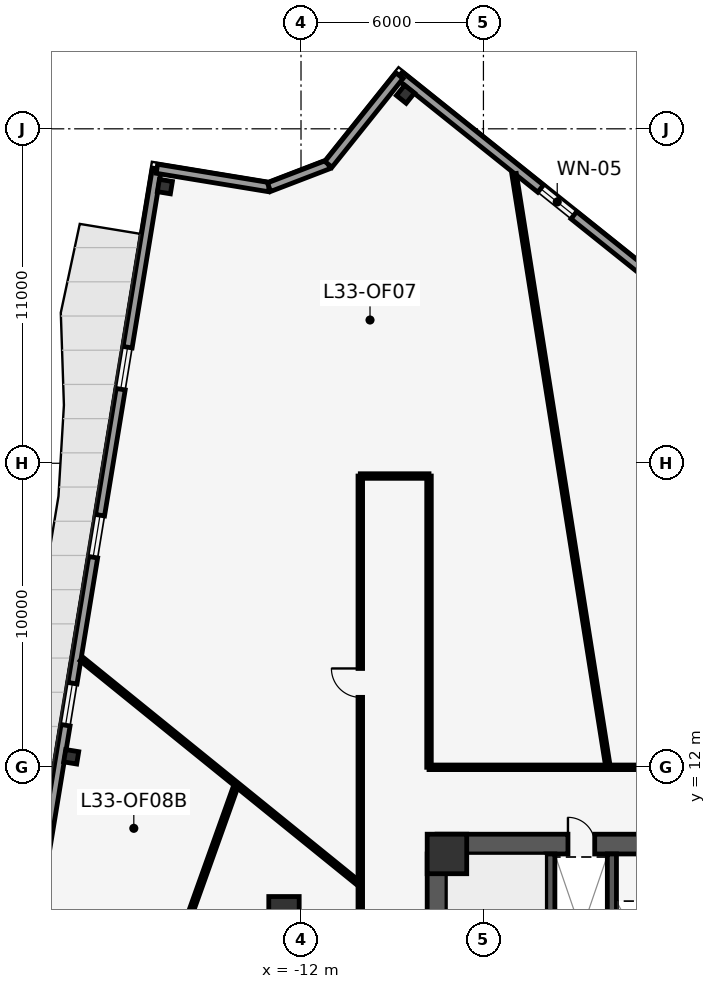
"""IFC4 building model, lengths in metres.
Left out: names, types, materials, properties, quantities, classifications, styles, units other than length and angle.
Written with IfcOpenShell. Run it as: python <this file> out.ifc"""

import sys

from ifc_helpers import new_model, si_unit, direction, frame, frame_2d, origin, origin_2d, place, context, subcontext, project, spatial, rectangle, i_section, extrude, element, fill, save


model = new_model("IFC4")
c1 = context("Model", 3, precision=1e-05, world=origin(), true_north=direction((0.0, 1.0)))
c2 = subcontext(c1, "Body", "Model", "MODEL_VIEW")
j1 = project(units=[si_unit("LENGTHUNIT", "METRE"), si_unit("PLANEANGLEUNIT", "RADIAN")], contexts=[c1])
p1 = place(None, origin())
s1 = spatial("IfcSite", under=j1, at=p1, CompositionType="ELEMENT")
p2 = place(p1, origin())
s2 = spatial("IfcBuilding", under=s1, at=p2, CompositionType="ELEMENT")
p3 = place(p2, frame((0.0, 0.0, 144.5)))
s3 = spatial("IfcBuildingStorey", under=s2, at=p3, CompositionType="ELEMENT", Elevation=144.5)
p4 = place(p3, frame((-7.525, 9.475, 0.0), z_axis=(0.0, 0.0, 1.0), x_axis=(1.0, 0.0, 0.0)))
e1 = element("IfcWall", 1, at=p4, inside=s3, PredefinedType="SHEAR", context=c2, shape_type="SweptSolid", body=[
    extrude(rectangle(XDim=15.05, YDim=0.65, at=frame_2d((7.525, 0.0))), origin(), (0.0, 0.0, 1.0), 3.85),
])
p5 = place(p4, frame((6.975, 0.0, 0.0)))
e2 = element("IfcOpeningElement", 2, at=p5, cuts=e1, PredefinedType="OPENING", context=c2, shape_type="SweptSolid", body=[
    extrude(rectangle(XDim=1.1, YDim=2.15, at=frame_2d((0.55, 1.075))), frame((0.0, 0.335, 0.0), z_axis=(0.0, -1.0, 0.0), x_axis=(1.0, 0.0, 0.0)), (0.0, 0.0, 1.0), 0.67),
])
p6 = place(p4, frame((4.305, 0.0, 0.0)))
e3 = element("IfcOpeningElement", 3, at=p6, cuts=e1, PredefinedType="OPENING", context=c2, shape_type="SweptSolid", body=[
    extrude(rectangle(XDim=0.88, YDim=2.15, at=frame_2d((0.44, 1.075))), frame((0.0, 0.335, 0.0), z_axis=(0.0, -1.0, 0.0), x_axis=(1.0, 0.0, 0.0)), (0.0, 0.0, 1.0), 0.67),
])
p7 = place(p4, frame((9.865, 0.0, 0.0)))
e4 = element("IfcOpeningElement", 4, at=p7, cuts=e1, PredefinedType="OPENING", context=c2, shape_type="SweptSolid", body=[
    extrude(rectangle(XDim=0.88, YDim=2.15, at=frame_2d((0.44, 1.075))), frame((0.0, 0.335, 0.0), z_axis=(0.0, -1.0, 0.0), x_axis=(1.0, 0.0, 0.0)), (0.0, 0.0, 1.0), 0.67),
])
for number, where, z_axis, x_axis in (
    (5, (-3.8, 1.45, 0.0), (0.0, 0.0, 1.0), (0.0, 1.0, 0.0)),
    (6, (-1.775, 1.45, 0.0), (0.0, 0.0, 1.0), (0.0, 1.0, 0.0)),
):
    element("IfcWall", number, at=place(p3, frame(where, z_axis=z_axis, x_axis=x_axis)), inside=s3, PredefinedType="SHEAR", context=c2, shape_type="SweptSolid", body=[
        extrude(rectangle(XDim=7.7, YDim=0.3, at=frame_2d((3.85, 0.0))), origin(), (0.0, 0.0, 1.0), 3.85),
    ])
p8 = place(p3, frame((-7.525, 0.1, 0.0), z_axis=(0.0, 0.0, 1.0), x_axis=(0.0, 1.0, 0.0)))
e7 = element("IfcWall", 7, at=p8, inside=s3, PredefinedType="SHEAR", context=c2, shape_type="SweptSolid", body=[
    extrude(rectangle(XDim=9.05, YDim=0.65, at=frame_2d((4.525, 0.0))), origin(), (0.0, 0.0, 1.0), 3.85),
])
p9 = place(p3, frame((-7.2, 9.15, 0.0), z_axis=(0.0, 0.0, 1.0), x_axis=(1.0, 0.0, 0.0)))
e8 = element("IfcColumn", 8, at=p9, inside=s3, PredefinedType="COLUMN", context=c2, shape_type="SweptSolid", body=[
    extrude(rectangle(XDim=1.3, YDim=1.3, at=origin_2d()), origin(), (0.0, 0.0, 1.0), 4.1),
])
p10 = place(p3, frame((-12.56, 7.25, 0.0), z_axis=(0.0, 0.0, 1.0), x_axis=(1.0, 0.0, 0.0)))
e9 = element("IfcColumn", 9, at=p10, inside=s3, PredefinedType="COLUMN", context=c2, shape_type="SweptSolid", body=[
    extrude(rectangle(XDim=1.0, YDim=1.0, at=origin_2d()), origin(), (0.0, 0.0, 1.0), 4.1),
])
for number, where, z_axis, x_axis in (
    (10, (-16.477, 31.1, 0.0), (0.0, 0.0, 1.0), (0.162, 0.987, 0.0)),
    (11, (-19.559, 12.346, 0.0), (0.0, 0.0, 1.0), (0.162, 0.987, 0.0)),
    (12, (-8.565, 34.138, 0.0), (0.0, 0.0, 1.0), (-0.781, 0.625, 0.0)),
):
    element("IfcColumn", number, at=place(p3, frame(where, z_axis=z_axis, x_axis=x_axis)), inside=s3, PredefinedType="COLUMN", context=c2, shape_type="SweptSolid", body=[
        extrude(i_section(OverallWidth=0.411, OverallDepth=0.434, WebThickness=0.036, FlangeThickness=0.057, at=origin_2d()), origin(), (0.0, 0.0, 1.0), 4.1),
    ])
p11 = place(p3, frame((-8.762, 34.748, 0.0), z_axis=(0.0, 0.0, 1.0), x_axis=(0.780669916438, -0.624943582708, 0.0)))
e13 = element("IfcWall", 13, at=p11, inside=s3, PredefinedType="STANDARD", context=c2, shape_type="SweptSolid", body=[
    extrude(rectangle(XDim=58.093, YDim=0.3, at=frame_2d((29.046, 0.0))), origin(), (0.0, 0.0, 1.0), 3.85),
])
p12 = place(p11, frame((5.947, 0.0, 0.85)))
e14 = element("IfcOpeningElement", 14, at=p12, cuts=e13, PredefinedType="OPENING", context=c2, shape_type="SweptSolid", body=[
    extrude(rectangle(XDim=1.4, YDim=2.2, at=frame_2d((0.7, 1.1))), frame((0.0, 0.16, 0.0), z_axis=(0.0, -1.0, 0.0), x_axis=(1.0, 0.0, 0.0)), (0.0, 0.0, 1.0), 0.32),
])
p13 = place(p11, frame((11.547, 0.0, 0.85)))
e15 = element("IfcOpeningElement", 15, at=p13, cuts=e13, PredefinedType="OPENING", context=c2, shape_type="SweptSolid", body=[
    extrude(rectangle(XDim=1.4, YDim=2.2, at=frame_2d((0.7, 1.1))), frame((0.0, 0.16, 0.0), z_axis=(0.0, -1.0, 0.0), x_axis=(1.0, 0.0, 0.0)), (0.0, 0.0, 1.0), 0.32),
])
p14 = place(p11, frame((17.146, 0.0, 0.85)))
e16 = element("IfcOpeningElement", 16, at=p14, cuts=e13, PredefinedType="OPENING", context=c2, shape_type="SweptSolid", body=[
    extrude(rectangle(XDim=1.4, YDim=2.2, at=frame_2d((0.7, 1.1))), frame((0.0, 0.16, 0.0), z_axis=(0.0, -1.0, 0.0), x_axis=(1.0, 0.0, 0.0)), (0.0, 0.0, 1.0), 0.32),
])
p15 = place(p11, frame((22.747, 0.0, 0.85)))
e17 = element("IfcOpeningElement", 17, at=p15, cuts=e13, PredefinedType="OPENING", context=c2, shape_type="SweptSolid", body=[
    extrude(rectangle(XDim=1.4, YDim=2.2, at=frame_2d((0.7, 1.1))), frame((0.0, 0.16, 0.0), z_axis=(0.0, -1.0, 0.0), x_axis=(1.0, 0.0, 0.0)), (0.0, 0.0, 1.0), 0.32),
])
p16 = place(p11, frame((28.347, 0.0, 0.85)))
e18 = element("IfcOpeningElement", 18, at=p16, cuts=e13, PredefinedType="OPENING", context=c2, shape_type="SweptSolid", body=[
    extrude(rectangle(XDim=1.4, YDim=2.2, at=frame_2d((0.7, 1.1))), frame((0.0, 0.16, 0.0), z_axis=(0.0, -1.0, 0.0), x_axis=(1.0, 0.0, 0.0)), (0.0, 0.0, 1.0), 0.32),
])
p17 = place(p11, frame((33.947, 0.0, 0.85)))
e19 = element("IfcOpeningElement", 19, at=p17, cuts=e13, PredefinedType="OPENING", context=c2, shape_type="SweptSolid", body=[
    extrude(rectangle(XDim=1.4, YDim=2.2, at=frame_2d((0.7, 1.1))), frame((0.0, 0.16, 0.0), z_axis=(0.0, -1.0, 0.0), x_axis=(1.0, 0.0, 0.0)), (0.0, 0.0, 1.0), 0.32),
])
p18 = place(p11, frame((39.547, 0.0, 0.85)))
e20 = element("IfcOpeningElement", 20, at=p18, cuts=e13, PredefinedType="OPENING", context=c2, shape_type="SweptSolid", body=[
    extrude(rectangle(XDim=1.4, YDim=2.2, at=frame_2d((0.7, 1.1))), frame((0.0, 0.16, 0.0), z_axis=(0.0, -1.0, 0.0), x_axis=(1.0, 0.0, 0.0)), (0.0, 0.0, 1.0), 0.32),
])
p19 = place(p11, frame((45.146, 0.0, 0.85)))
e21 = element("IfcOpeningElement", 21, at=p19, cuts=e13, PredefinedType="OPENING", context=c2, shape_type="SweptSolid", body=[
    extrude(rectangle(XDim=1.4, YDim=2.2, at=frame_2d((0.7, 1.1))), frame((0.0, 0.16, 0.0), z_axis=(0.0, -1.0, 0.0), x_axis=(1.0, 0.0, 0.0)), (0.0, 0.0, 1.0), 0.32),
])
p20 = place(p11, frame((50.747, 0.0, 0.85)))
e22 = element("IfcOpeningElement", 22, at=p20, cuts=e13, PredefinedType="OPENING", context=c2, shape_type="SweptSolid", body=[
    extrude(rectangle(XDim=1.4, YDim=2.2, at=frame_2d((0.7, 1.1))), frame((0.0, 0.16, 0.0), z_axis=(0.0, -1.0, 0.0), x_axis=(1.0, 0.0, 0.0)), (0.0, 0.0, 1.0), 0.32),
])
p21 = place(p3, frame((-26.15, -25.64, 0.0), z_axis=(0.0, 0.0, 1.0), x_axis=(0.161975761987, 0.986794736776, 0.0)))
e23 = element("IfcWall", 23, at=p21, inside=s3, PredefinedType="STANDARD", context=c2, shape_type="SweptSolid", body=[
    extrude(rectangle(XDim=58.093, YDim=0.3, at=frame_2d((29.046, 0.0))), origin(), (0.0, 0.0, 1.0), 3.85),
])
p22 = place(p21, frame((28.546, 0.0, 0.0)))
e24 = element("IfcOpeningElement", 24, at=p22, cuts=e23, PredefinedType="OPENING", context=c2, shape_type="SweptSolid", body=[
    extrude(rectangle(XDim=1.0, YDim=2.15, at=frame_2d((0.5, 1.075))), frame((0.0, 0.16, 0.0), z_axis=(0.0, -1.0, 0.0), x_axis=(1.0, 0.0, 0.0)), (0.0, 0.0, 1.0), 0.32),
])
p23 = place(p21, frame((5.947, 0.0, 0.85)))
e25 = element("IfcOpeningElement", 25, at=p23, cuts=e23, PredefinedType="OPENING", context=c2, shape_type="SweptSolid", body=[
    extrude(rectangle(XDim=1.4, YDim=2.2, at=frame_2d((0.7, 1.1))), frame((0.0, 0.16, 0.0), z_axis=(0.0, -1.0, 0.0), x_axis=(1.0, 0.0, 0.0)), (0.0, 0.0, 1.0), 0.32),
])
p24 = place(p21, frame((11.546, 0.0, 0.85)))
e26 = element("IfcOpeningElement", 26, at=p24, cuts=e23, PredefinedType="OPENING", context=c2, shape_type="SweptSolid", body=[
    extrude(rectangle(XDim=1.4, YDim=2.2, at=frame_2d((0.7, 1.1))), frame((0.0, 0.16, 0.0), z_axis=(0.0, -1.0, 0.0), x_axis=(1.0, 0.0, 0.0)), (0.0, 0.0, 1.0), 0.32),
])
p25 = place(p21, frame((17.146, 0.0, 0.85)))
e27 = element("IfcOpeningElement", 27, at=p25, cuts=e23, PredefinedType="OPENING", context=c2, shape_type="SweptSolid", body=[
    extrude(rectangle(XDim=1.4, YDim=2.2, at=frame_2d((0.7, 1.1))), frame((0.0, 0.16, 0.0), z_axis=(0.0, -1.0, 0.0), x_axis=(1.0, 0.0, 0.0)), (0.0, 0.0, 1.0), 0.32),
])
p26 = place(p21, frame((33.947, 0.0, 0.85)))
e28 = element("IfcOpeningElement", 28, at=p26, cuts=e23, PredefinedType="OPENING", context=c2, shape_type="SweptSolid", body=[
    extrude(rectangle(XDim=1.4, YDim=2.2, at=frame_2d((0.7, 1.1))), frame((0.0, 0.16, 0.0), z_axis=(0.0, -1.0, 0.0), x_axis=(1.0, 0.0, 0.0)), (0.0, 0.0, 1.0), 0.32),
])
p27 = place(p21, frame((39.546, 0.0, 0.85)))
e29 = element("IfcOpeningElement", 29, at=p27, cuts=e23, PredefinedType="OPENING", context=c2, shape_type="SweptSolid", body=[
    extrude(rectangle(XDim=1.4, YDim=2.2, at=frame_2d((0.7, 1.1))), frame((0.0, 0.16, 0.0), z_axis=(0.0, -1.0, 0.0), x_axis=(1.0, 0.0, 0.0)), (0.0, 0.0, 1.0), 0.32),
])
p28 = place(p21, frame((45.146, 0.0, 0.85)))
e30 = element("IfcOpeningElement", 30, at=p28, cuts=e23, PredefinedType="OPENING", context=c2, shape_type="SweptSolid", body=[
    extrude(rectangle(XDim=1.4, YDim=2.2, at=frame_2d((0.7, 1.1))), frame((0.0, 0.16, 0.0), z_axis=(0.0, -1.0, 0.0), x_axis=(1.0, 0.0, 0.0)), (0.0, 0.0, 1.0), 0.32),
])
p29 = place(p21, frame((50.747, 0.0, 0.85)))
e31 = element("IfcOpeningElement", 31, at=p29, cuts=e23, PredefinedType="OPENING", context=c2, shape_type="SweptSolid", body=[
    extrude(rectangle(XDim=1.4, YDim=2.2, at=frame_2d((0.7, 1.1))), frame((0.0, 0.16, 0.0), z_axis=(0.0, -1.0, 0.0), x_axis=(1.0, 0.0, 0.0)), (0.0, 0.0, 1.0), 0.32),
])
p30 = place(p3, frame((-16.74, 31.686, 0.0), z_axis=(0.0, 0.0, 1.0), x_axis=(0.986793455184, -0.161983569556, 0.0)))
e32 = element("IfcWall", 32, at=p30, inside=s3, PredefinedType="STANDARD", context=c2, shape_type="SweptSolid", body=[
    extrude(rectangle(XDim=3.738, YDim=0.3, at=frame_2d((1.869, 0.0))), origin(), (0.0, 0.0, 1.0), 3.85),
])
p31 = place(p3, frame((-13.052, 31.08, 0.0), z_axis=(0.0, 0.0, 1.0), x_axis=(0.933582919313, 0.35836145547, 0.0)))
e33 = element("IfcWall", 33, at=p31, inside=s3, PredefinedType="STANDARD", context=c2, shape_type="SweptSolid", body=[
    extrude(rectangle(XDim=2.093, YDim=0.3, at=frame_2d((1.046, 0.0))), origin(), (0.0, 0.0, 1.0), 3.85),
])
p32 = place(p3, frame((-11.098, 31.83, 0.0), z_axis=(0.0, 0.0, 1.0), x_axis=(0.624949908599, 0.78066485238, 0.0)))
e34 = element("IfcWall", 34, at=p32, inside=s3, PredefinedType="STANDARD", context=c2, shape_type="SweptSolid", body=[
    extrude(rectangle(XDim=3.738, YDim=0.3, at=frame_2d((1.869, 0.0))), origin(), (0.0, 0.0, 1.0), 3.85),
])
p33 = place(p3, frame((-10.05, 0.13, 0.0), z_axis=(0.0, 0.0, 1.0), x_axis=(0.0, 1.0, 0.0)))
e35 = element("IfcWall", 35, at=p33, inside=s3, PredefinedType="PARTITIONING", context=c2, shape_type="SweptSolid", body=[
    extrude(rectangle(XDim=21.45, YDim=0.15, at=frame_2d((10.725, 0.0))), origin(), (0.0, 0.0, 1.0), 3.85),
])
p34 = place(p33, frame((14.171, 0.0, 0.0)))
e36 = element("IfcOpeningElement", 36, at=p34, cuts=e35, PredefinedType="OPENING", context=c2, shape_type="SweptSolid", body=[
    extrude(rectangle(XDim=0.95, YDim=2.15, at=frame_2d((0.475, 1.075))), frame((0.0, 0.085, 0.0), z_axis=(0.0, -1.0, 0.0), x_axis=(1.0, 0.0, 0.0)), (0.0, 0.0, 1.0), 0.17),
])
p35 = place(p3, frame((-10.05, 21.58, 0.0), z_axis=(0.0, 0.0, 1.0), x_axis=(1.0, 0.0, 0.0)))
e37 = element("IfcWall", 37, at=p35, inside=s3, PredefinedType="PARTITIONING", context=c2, shape_type="SweptSolid", body=[
    extrude(rectangle(XDim=2.26, YDim=0.15, at=frame_2d((1.13, 0.0))), origin(), (0.0, 0.0, 1.0), 3.85),
])
p36 = place(p3, frame((-7.79, 21.58, 0.0), z_axis=(0.0, 0.0, 1.0), x_axis=(0.0, -1.0, 0.0)))
e38 = element("IfcWall", 38, at=p36, inside=s3, PredefinedType="PARTITIONING", context=c2, shape_type="SweptSolid", body=[
    extrude(rectangle(XDim=9.58, YDim=0.15, at=frame_2d((4.79, 0.0))), origin(), (0.0, 0.0, 1.0), 3.85),
])
p37 = place(p3, frame((-7.79, 12.0, 0.0), z_axis=(0.0, 0.0, 1.0), x_axis=(1.0, 0.0, 0.0)))
e39 = element("IfcWall", 39, at=p37, inside=s3, PredefinedType="PARTITIONING", context=c2, shape_type="SweptSolid", body=[
    extrude(rectangle(XDim=15.58, YDim=0.15, at=frame_2d((7.79, 0.0))), origin(), (0.0, 0.0, 1.0), 3.85),
])
p38 = place(p37, frame((10.125, 0.0, 0.0)))
e40 = element("IfcOpeningElement", 40, at=p38, cuts=e39, PredefinedType="OPENING", context=c2, shape_type="SweptSolid", body=[
    extrude(rectangle(XDim=0.95, YDim=2.15, at=frame_2d((0.475, 1.075))), frame((0.0, 0.085, 0.0), z_axis=(0.0, -1.0, 0.0), x_axis=(1.0, 0.0, 0.0)), (0.0, 0.0, 1.0), 0.17),
])
p39 = place(p3, frame((-1.917, 12.105, 0.0), z_axis=(0.0, 0.0, 1.0), x_axis=(-0.156433889955, 0.98768843168, 0.0)))
e41 = element("IfcWall", 41, at=p39, inside=s3, PredefinedType="PARTITIONING", context=c2, shape_type="SweptSolid", body=[
    extrude(rectangle(XDim=19.656, YDim=0.15, at=frame_2d((9.828, 0.0))), origin(), (0.0, 0.0, 1.0), 2.898),
])
p40 = place(p3, frame((-10.155, 8.223, 0.0), z_axis=(0.0, 0.0, 1.0), x_axis=(-0.777144444288, 0.629322264593, 0.0)))
e42 = element("IfcWall", 42, at=p40, inside=s3, PredefinedType="PARTITIONING", context=c2, shape_type="SweptSolid", body=[
    extrude(rectangle(XDim=11.664, YDim=0.15, at=frame_2d((5.832, 0.0))), origin(), (0.0, 0.0, 1.0), 3.85),
])
p41 = place(p3, frame((-14.133, 11.412, 0.0), z_axis=(0.0, 0.0, 1.0), x_axis=(-0.336734629302, -0.941599590818, 0.0)))
e43 = element("IfcWall", 43, at=p41, inside=s3, PredefinedType="PARTITIONING", context=c2, shape_type="SweptSolid", body=[
    extrude(rectangle(XDim=11.961, YDim=0.15, at=frame_2d((5.98, 0.0))), origin(), (0.0, 0.0, 1.0), 3.367),
])
p42 = place(p41, frame((5.53, 0.0, 0.0)))
e44 = element("IfcOpeningElement", 44, at=p42, cuts=e43, PredefinedType="OPENING", context=c2, shape_type="SweptSolid", body=[
    extrude(rectangle(XDim=0.9, YDim=2.1, at=frame_2d((0.45, 1.05))), frame((0.0, 0.085, 0.0), z_axis=(0.0, -1.0, 0.0), x_axis=(1.0, 0.0, 0.0)), (0.0, 0.0, 1.0), 0.17),
])
p43 = place(p12, origin())
e45 = element("IfcWindow", 45, at=p43, inside=s3, PartitioningType="SINGLE_PANEL", PredefinedType="WINDOW", context=c2, shape_type="SweptSolid", body=[
    extrude(rectangle(XDim=1.4, YDim=2.2, at=frame_2d((0.7, 1.1))), frame((0.0, 0.03, 0.0), z_axis=(0.0, -1.0, 0.0), x_axis=(1.0, 0.0, 0.0)), (0.0, 0.0, 1.0), 0.06),
])
fill(e14, e45)
p44 = place(p27, origin())
e46 = element("IfcWindow", 46, at=p44, inside=s3, PartitioningType="SINGLE_PANEL", PredefinedType="WINDOW", context=c2, shape_type="SweptSolid", body=[
    extrude(rectangle(XDim=1.4, YDim=2.2, at=frame_2d((0.7, 1.1))), frame((0.0, 0.03, 0.0), z_axis=(0.0, -1.0, 0.0), x_axis=(1.0, 0.0, 0.0)), (0.0, 0.0, 1.0), 0.06),
])
fill(e29, e46)
p45 = place(p28, origin())
e47 = element("IfcWindow", 47, at=p45, inside=s3, PartitioningType="SINGLE_PANEL", PredefinedType="WINDOW", context=c2, shape_type="SweptSolid", body=[
    extrude(rectangle(XDim=1.4, YDim=2.2, at=frame_2d((0.7, 1.1))), frame((0.0, 0.03, 0.0), z_axis=(0.0, -1.0, 0.0), x_axis=(1.0, 0.0, 0.0)), (0.0, 0.0, 1.0), 0.06),
])
fill(e30, e47)
p46 = place(p29, origin())
e48 = element("IfcWindow", 48, at=p46, inside=s3, PartitioningType="SINGLE_PANEL", PredefinedType="WINDOW", context=c2, shape_type="SweptSolid", body=[
    extrude(rectangle(XDim=1.4, YDim=2.2, at=frame_2d((0.7, 1.1))), frame((0.0, 0.03, 0.0), z_axis=(0.0, -1.0, 0.0), x_axis=(1.0, 0.0, 0.0)), (0.0, 0.0, 1.0), 0.06),
])
fill(e31, e48)
p47 = place(p6, origin())
e49 = element("IfcDoor", 49, at=p47, inside=s3, OperationType="SINGLE_SWING_LEFT", PredefinedType="DOOR", context=c2, shape_type="SweptSolid", body=[
    extrude(rectangle(XDim=0.88, YDim=2.15, at=frame_2d((0.44, 1.075))), frame((0.0, 0.025, 0.0), z_axis=(0.0, -1.0, 0.0), x_axis=(1.0, 0.0, 0.0)), (0.0, 0.0, 1.0), 0.05),
])
fill(e3, e49)
p48 = place(p34, origin())
e50 = element("IfcDoor", 50, at=p48, inside=s3, OperationType="SINGLE_SWING_RIGHT", PredefinedType="DOOR", context=c2, shape_type="SweptSolid", body=[
    extrude(rectangle(XDim=0.95, YDim=2.15, at=frame_2d((0.475, 1.075))), frame((0.0, 0.025, 0.0), z_axis=(0.0, -1.0, 0.0), x_axis=(1.0, 0.0, 0.0)), (0.0, 0.0, 1.0), 0.05),
])
fill(e36, e50)
save(model, sys.argv[1])
